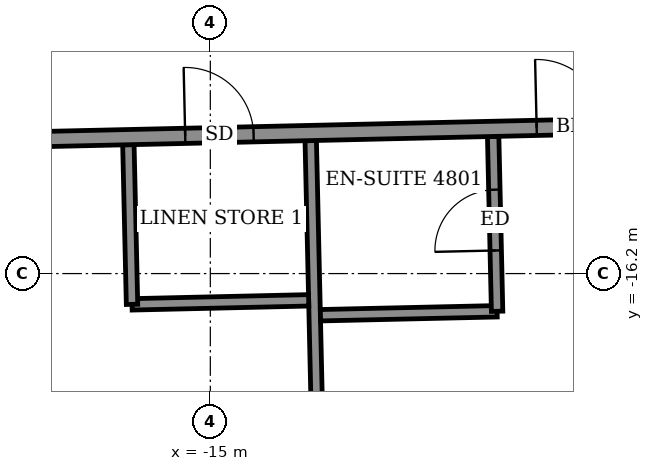
"""IFC4 building model, lengths in metres.
Left out: names, types, materials, properties, quantities, classifications, styles, units other than length and angle.
Written with IfcOpenShell. Run it as: python <this file> out.ifc"""

import sys

from ifc_helpers import new_model, si_unit, direction, frame, frame_2d, origin, place, context, subcontext, project, spatial, rectangle, extrude, element, fill, save


model = new_model("IFC4")
c1 = context("Model", 3, precision=1e-05, world=origin(), true_north=direction((0.0, 1.0)))
c2 = subcontext(c1, "Body", "Model", "MODEL_VIEW")
j1 = project(units=[si_unit("LENGTHUNIT", "METRE"), si_unit("PLANEANGLEUNIT", "RADIAN")], contexts=[c1])
p1 = place(None, origin())
s1 = spatial("IfcSite", under=j1, at=p1, CompositionType="ELEMENT")
p2 = place(p1, origin())
s2 = spatial("IfcBuilding", under=s1, at=p2, CompositionType="ELEMENT")
p3 = place(p2, frame((0.0, 0.0, 189.7)))
s3 = spatial("IfcBuildingStorey", under=s2, at=p3, CompositionType="ELEMENT", Elevation=189.7)
p4 = place(p3, frame((-13.544, -20.399, 0.0), z_axis=(0.0, 0.0, 1.0), x_axis=(-0.022692509051, 0.999742491861, 0.0)))
e1 = element("IfcWall", 1, at=p4, inside=s3, PredefinedType="PARTITIONING", context=c2, shape_type="SweptSolid", body=[
    extrude(rectangle(XDim=5.949, YDim=0.15, at=frame_2d((2.975, 0.0))), origin(), (0.0, 0.0, 1.0), 2.55),
])
p5 = place(p3, frame((-13.551, -16.748, 0.0), z_axis=(0.0, 0.0, 1.0), x_axis=(0.999749744571, 0.022370700241, 0.0)))
e2 = element("IfcWall", 2, at=p5, inside=s3, PredefinedType="PARTITIONING", context=c2, shape_type="SweptSolid", body=[
    extrude(rectangle(XDim=2.324, YDim=0.15, at=frame_2d((1.162, 0.0))), origin(), (0.0, 0.0, 1.0), 3.05),
])
p6 = place(p3, frame((-11.227, -16.696, 0.0), z_axis=(0.0, 0.0, 1.0), x_axis=(-0.022603288534, 0.999744513037, 0.0)))
e3 = element("IfcWall", 3, at=p6, inside=s3, PredefinedType="PARTITIONING", context=c2, shape_type="SweptSolid", body=[
    extrude(rectangle(XDim=2.301, YDim=0.15, at=frame_2d((1.15, 0.0))), origin(), (0.0, 0.0, 1.0), 3.05),
])
p7 = place(p6, frame((0.8, 0.0, 0.0)))
e4 = element("IfcOpeningElement", 4, at=p7, cuts=e3, PredefinedType="OPENING", context=c2, shape_type="SweptSolid", body=[
    extrude(rectangle(XDim=0.8, YDim=2.1, at=frame_2d((0.4, 1.05))), frame((0.0, 0.085, 0.0), z_axis=(0.0, -1.0, 0.0), x_axis=(1.0, 0.0, 0.0)), (0.0, 0.0, 1.0), 0.17),
])
p8 = place(p3, frame((-16.03, -16.605, 0.0), z_axis=(0.0, 0.0, 1.0), x_axis=(0.999740260747, 0.02279059109, 0.0)))
e5 = element("IfcWall", 5, at=p8, inside=s3, PredefinedType="PARTITIONING", context=c2, shape_type="SweptSolid", body=[
    extrude(rectangle(XDim=2.324, YDim=0.15, at=frame_2d((1.162, 0.0))), origin(), (0.0, 0.0, 1.0), 3.05),
])
p9 = place(p3, frame((-16.03, -16.605, 0.0), z_axis=(0.0, 0.0, 1.0), x_axis=(-0.022779486249, 0.999740513837, 0.0)))
e6 = element("IfcWall", 6, at=p9, inside=s3, PredefinedType="PARTITIONING", context=c2, shape_type="SweptSolid", body=[
    extrude(rectangle(XDim=2.101, YDim=0.15, at=frame_2d((1.05, 0.0))), origin(), (0.0, 0.0, 1.0), 3.05),
])
p10 = place(p3, frame((-21.279, -14.523, 0.0), z_axis=(0.0, 0.0, 1.0), x_axis=(0.999742878501, 0.022675468818, 0.0)))
e7 = element("IfcWall", 7, at=p10, inside=s3, PredefinedType="PARTITIONING", context=c2, shape_type="SweptSolid", body=[
    extrude(rectangle(XDim=46.48, YDim=0.2, at=frame_2d((23.24, 0.0))), origin(), (0.0, 0.0, 1.0), 3.05),
])
p11 = place(p10, frame((1.4, 0.0, 0.0)))
e8 = element("IfcOpeningElement", 8, at=p11, cuts=e7, PredefinedType="OPENING", context=c2, shape_type="SweptSolid", body=[
    extrude(rectangle(XDim=1.0, YDim=2.1, at=frame_2d((0.5, 1.05))), frame((0.0, 0.11, 0.0), z_axis=(0.0, -1.0, 0.0), x_axis=(1.0, 0.0, 0.0)), (0.0, 0.0, 1.0), 0.22),
])
p12 = place(p10, frame((5.95, 0.0, 0.0)))
e9 = element("IfcOpeningElement", 9, at=p12, cuts=e7, PredefinedType="OPENING", context=c2, shape_type="SweptSolid", body=[
    extrude(rectangle(XDim=0.9, YDim=2.1, at=frame_2d((0.45, 1.05))), frame((0.0, 0.11, 0.0), z_axis=(0.0, -1.0, 0.0), x_axis=(1.0, 0.0, 0.0)), (0.0, 0.0, 1.0), 0.22),
])
p13 = place(p10, frame((10.575, 0.0, 0.0)))
e10 = element("IfcOpeningElement", 10, at=p13, cuts=e7, PredefinedType="OPENING", context=c2, shape_type="SweptSolid", body=[
    extrude(rectangle(XDim=0.9, YDim=2.1, at=frame_2d((0.45, 1.05))), frame((0.0, 0.11, 0.0), z_axis=(0.0, -1.0, 0.0), x_axis=(1.0, 0.0, 0.0)), (0.0, 0.0, 1.0), 0.22),
])
p14 = place(p10, frame((12.625, 0.0, 0.0)))
e11 = element("IfcOpeningElement", 11, at=p14, cuts=e7, PredefinedType="OPENING", context=c2, shape_type="SweptSolid", body=[
    extrude(rectangle(XDim=0.9, YDim=2.1, at=frame_2d((0.45, 1.05))), frame((0.0, 0.11, 0.0), z_axis=(0.0, -1.0, 0.0), x_axis=(1.0, 0.0, 0.0)), (0.0, 0.0, 1.0), 0.22),
])
p15 = place(p10, frame((19.4, 0.0, 0.0)))
e12 = element("IfcOpeningElement", 12, at=p15, cuts=e7, PredefinedType="OPENING", context=c2, shape_type="SweptSolid", body=[
    extrude(rectangle(XDim=0.9, YDim=2.1, at=frame_2d((0.45, 1.05))), frame((0.0, 0.11, 0.0), z_axis=(0.0, -1.0, 0.0), x_axis=(1.0, 0.0, 0.0)), (0.0, 0.0, 1.0), 0.22),
])
p16 = place(p10, frame((21.375, 0.0, 0.0)))
e13 = element("IfcOpeningElement", 13, at=p16, cuts=e7, PredefinedType="OPENING", context=c2, shape_type="SweptSolid", body=[
    extrude(rectangle(XDim=0.9, YDim=2.1, at=frame_2d((0.45, 1.05))), frame((0.0, 0.11, 0.0), z_axis=(0.0, -1.0, 0.0), x_axis=(1.0, 0.0, 0.0)), (0.0, 0.0, 1.0), 0.22),
])
p17 = place(p10, frame((28.15, 0.0, 0.0)))
e14 = element("IfcOpeningElement", 14, at=p17, cuts=e7, PredefinedType="OPENING", context=c2, shape_type="SweptSolid", body=[
    extrude(rectangle(XDim=0.9, YDim=2.1, at=frame_2d((0.45, 1.05))), frame((0.0, 0.11, 0.0), z_axis=(0.0, -1.0, 0.0), x_axis=(1.0, 0.0, 0.0)), (0.0, 0.0, 1.0), 0.22),
])
p18 = place(p10, frame((30.1, 0.0, 0.0)))
e15 = element("IfcOpeningElement", 15, at=p18, cuts=e7, PredefinedType="OPENING", context=c2, shape_type="SweptSolid", body=[
    extrude(rectangle(XDim=0.9, YDim=2.1, at=frame_2d((0.45, 1.05))), frame((0.0, 0.11, 0.0), z_axis=(0.0, -1.0, 0.0), x_axis=(1.0, 0.0, 0.0)), (0.0, 0.0, 1.0), 0.22),
])
p19 = place(p10, frame((36.875, 0.0, 0.0)))
e16 = element("IfcOpeningElement", 16, at=p19, cuts=e7, PredefinedType="OPENING", context=c2, shape_type="SweptSolid", body=[
    extrude(rectangle(XDim=0.9, YDim=2.1, at=frame_2d((0.45, 1.05))), frame((0.0, 0.11, 0.0), z_axis=(0.0, -1.0, 0.0), x_axis=(1.0, 0.0, 0.0)), (0.0, 0.0, 1.0), 0.22),
])
p20 = place(p10, frame((43.89, 0.0, 0.0)))
e17 = element("IfcOpeningElement", 17, at=p20, cuts=e7, PredefinedType="OPENING", context=c2, shape_type="SweptSolid", body=[
    extrude(rectangle(XDim=1.0, YDim=2.1, at=frame_2d((0.5, 1.05))), frame((0.0, 0.11, 0.0), z_axis=(0.0, -1.0, 0.0), x_axis=(1.0, 0.0, 0.0)), (0.0, 0.0, 1.0), 0.22),
])
p21 = place(p10, frame((39.05, 0.0, 0.0)))
e18 = element("IfcOpeningElement", 18, at=p21, cuts=e7, PredefinedType="OPENING", context=c2, shape_type="SweptSolid", body=[
    extrude(rectangle(XDim=0.9, YDim=2.1, at=frame_2d((0.45, 1.05))), frame((0.0, 0.11, 0.0), z_axis=(0.0, -1.0, 0.0), x_axis=(1.0, 0.0, 0.0)), (0.0, 0.0, 1.0), 0.22),
])
p22 = place(p12, origin())
e19 = element("IfcDoor", 19, at=p22, inside=s3, OperationType="SINGLE_SWING_LEFT", PredefinedType="DOOR", context=c2, shape_type="SweptSolid", body=[
    extrude(rectangle(XDim=0.9, YDim=2.1, at=frame_2d((0.45, 1.05))), frame((0.0, 0.025, 0.0), z_axis=(0.0, -1.0, 0.0), x_axis=(1.0, 0.0, 0.0)), (0.0, 0.0, 1.0), 0.05),
])
fill(e9, e19)
p23 = place(p13, origin())
e20 = element("IfcDoor", 20, at=p23, inside=s3, OperationType="SINGLE_SWING_LEFT", PredefinedType="DOOR", context=c2, shape_type="SweptSolid", body=[
    extrude(rectangle(XDim=0.9, YDim=2.1, at=frame_2d((0.45, 1.05))), frame((0.0, 0.025, 0.0), z_axis=(0.0, -1.0, 0.0), x_axis=(1.0, 0.0, 0.0)), (0.0, 0.0, 1.0), 0.05),
])
fill(e10, e20)
p24 = place(p7, origin())
e21 = element("IfcDoor", 21, at=p24, inside=s3, OperationType="SINGLE_SWING_LEFT", PredefinedType="DOOR", context=c2, shape_type="SweptSolid", body=[
    extrude(rectangle(XDim=0.8, YDim=2.1, at=frame_2d((0.4, 1.05))), frame((0.0, 0.025, 0.0), z_axis=(0.0, -1.0, 0.0), x_axis=(1.0, 0.0, 0.0)), (0.0, 0.0, 1.0), 0.05),
])
fill(e4, e21)
save(model, sys.argv[1])
